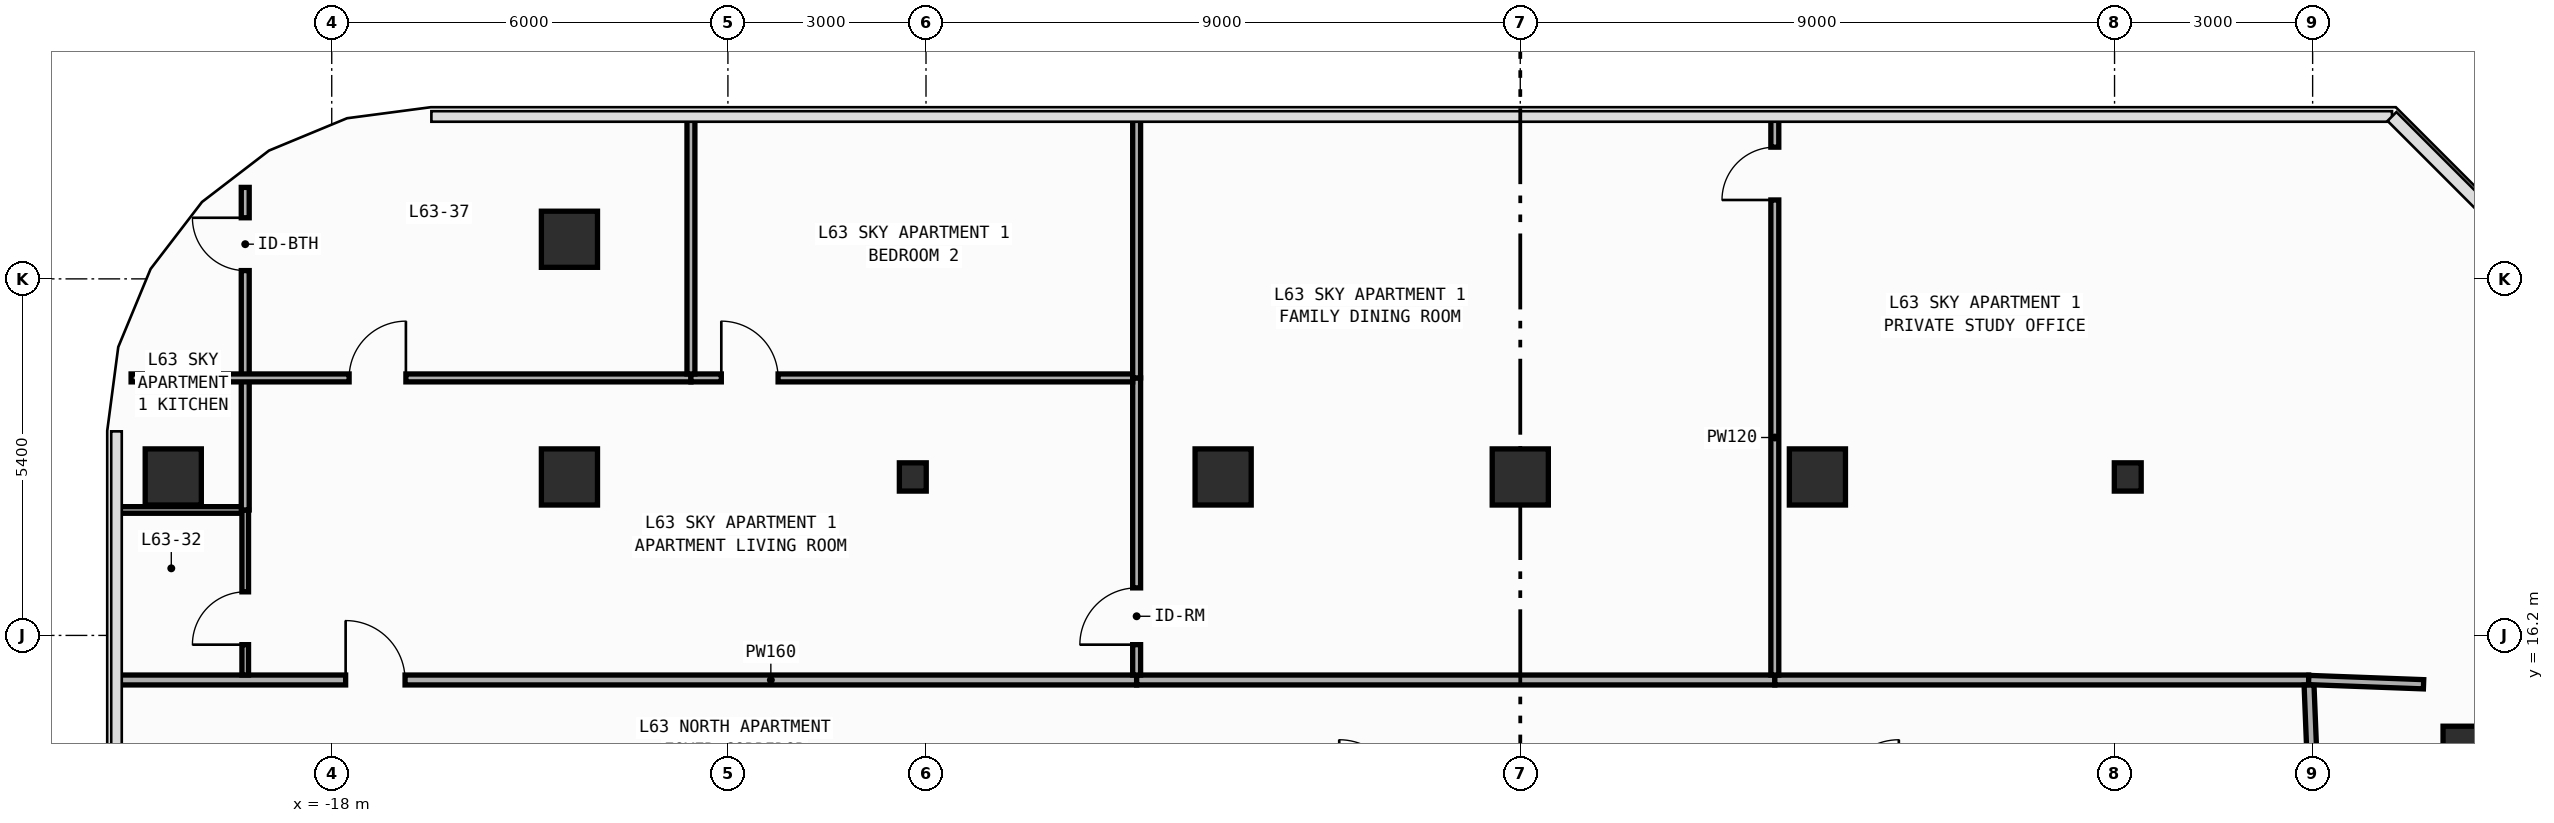
"""IFC4 building model, lengths in metres.
Left out: names, types, materials, properties, quantities, classifications, styles, units other than length and angle.
Written with IfcOpenShell. Run it as: python <this file> out.ifc"""

import sys

from ifc_helpers import new_model, si_unit, direction, frame, frame_2d, origin, origin_2d, place, context, subcontext, project, spatial, rectangle, i_section, extrude, element, fill, save


model = new_model("IFC4")
c1 = context("Model", 3, precision=1e-05, world=origin(), true_north=direction((0.0, 1.0)))
c2 = subcontext(c1, "Body", "Model", "MODEL_VIEW")
j1 = project(units=[si_unit("LENGTHUNIT", "METRE"), si_unit("PLANEANGLEUNIT", "RADIAN")], contexts=[c1])
p1 = place(None, origin())
s1 = spatial("IfcSite", under=j1, at=p1, CompositionType="ELEMENT")
p2 = place(p1, origin())
s2 = spatial("IfcBuilding", under=s1, at=p2, CompositionType="ELEMENT")
p3 = place(p2, frame((0.0, 0.0, 265.6)))
s3 = spatial("IfcBuildingStorey", under=s2, at=p3, CompositionType="ELEMENT", Elevation=265.6)
for number, where, z_axis, x_axis in (
    (1, (-9.2, 18.6, 0.0), (0.0, 0.0, 1.0), (1.0, 0.0, 0.0)),
    (2, (9.2, 18.6, 0.0), (0.0, 0.0, 1.0), (1.0, 0.0, 0.0)),
):
    element("IfcColumn", number, at=place(p3, frame(where, z_axis=z_axis, x_axis=x_axis)), inside=s3, PredefinedType="COLUMN", context=c2, shape_type="SweptSolid", body=[
        extrude(i_section(OverallWidth=0.407, OverallDepth=0.428, WebThickness=0.02, FlangeThickness=0.035, FilletRadius=0.022, at=origin_2d()), origin(), (0.0, 0.0, 1.0), 3.6),
    ])
for number, where, z_axis, x_axis in (
    (3, (-20.4, 18.6, 0.0), (0.0, 0.0, 1.0), (1.0, 0.0, 0.0)),
    (4, (-14.4, 18.6, 0.0), (0.0, 0.0, 1.0), (1.0, 0.0, 0.0)),
    (5, (14.4, 14.4, 0.0), (0.0, 0.0, 1.0), (1.0, 0.0, 0.0)),
    (6, (-4.5, 18.6, 0.0), (0.0, 0.0, 1.0), (1.0, 0.0, 0.0)),
    (7, (0.0, 18.6, 0.0), (0.0, 0.0, 1.0), (1.0, 0.0, 0.0)),
    (8, (4.5, 18.6, 0.0), (0.0, 0.0, 1.0), (1.0, 0.0, 0.0)),
    (9, (-14.4, 22.2, 0.0), (0.0, 0.0, 1.0), (1.0, 0.0, 0.0)),
):
    element("IfcColumn", number, at=place(p3, frame(where, z_axis=z_axis, x_axis=x_axis)), inside=s3, PredefinedType="COLUMN", context=c2, shape_type="SweptSolid", body=[
        extrude(rectangle(XDim=0.85, YDim=0.85, at=origin_2d()), origin(), (0.0, 0.0, 1.0), 3.6),
    ])
p4 = place(p3, frame((-21.255, 15.525, 0.0), z_axis=(0.0, 0.0, 1.0), x_axis=(1.0, 0.0, 0.0)))
e10 = element("IfcWall", 10, at=p4, inside=s3, PredefinedType="PARTITIONING", context=c2, shape_type="SweptSolid", body=[
    extrude(rectangle(XDim=15.445, YDim=0.15, at=frame_2d((7.722, 0.0))), origin(), (0.0, 0.0, 1.0), 3.34),
])
p5 = place(p4, frame((3.466, 0.0, 0.0)))
e11 = element("IfcOpeningElement", 11, at=p5, cuts=e10, PredefinedType="OPENING", context=c2, shape_type="SweptSolid", body=[
    extrude(rectangle(XDim=0.9, YDim=2.15, at=frame_2d((0.45, 1.075))), frame((0.0, 0.085, 0.0), z_axis=(0.0, -1.0, 0.0), x_axis=(1.0, 0.0, 0.0)), (0.0, 0.0, 1.0), 0.17),
])
p6 = place(p3, frame((-5.81, 15.525, 0.0), z_axis=(0.0, 0.0, 1.0), x_axis=(1.0, 0.0, 0.0)))
e12 = element("IfcWall", 12, at=p6, inside=s3, PredefinedType="PARTITIONING", context=c2, shape_type="SweptSolid", body=[
    extrude(rectangle(XDim=9.665, YDim=0.15, at=frame_2d((4.833, 0.0))), origin(), (0.0, 0.0, 1.0), 3.34),
])
p7 = place(p3, frame((3.855, 15.525, 0.0), z_axis=(0.0, 0.0, 1.0), x_axis=(1.0, 0.0, 0.0)))
e13 = element("IfcWall", 13, at=p7, inside=s3, PredefinedType="PARTITIONING", context=c2, shape_type="SweptSolid", body=[
    extrude(rectangle(XDim=8.085, YDim=0.15, at=frame_2d((4.042, 0.0))), origin(), (0.0, 0.0, 1.0), 3.34),
])
p8 = place(p3, frame((12.015, 13.72, 0.0), z_axis=(0.0, 0.0, 1.0), x_axis=(-0.040046877756, 0.99919780203, 0.0)))
e14 = element("IfcWall", 14, at=p8, inside=s3, PredefinedType="PARTITIONING", context=c2, shape_type="SweptSolid", body=[
    extrude(rectangle(XDim=1.731, YDim=0.15, at=frame_2d((0.866, 0.0))), origin(), (0.0, 0.0, 1.0), 3.34),
])
p9 = place(p3, frame((-21.255, 18.1, 0.0), z_axis=(0.0, 0.0, 1.0), x_axis=(1.0, 0.0, 0.0)))
e15 = element("IfcWall", 15, at=p9, inside=s3, PredefinedType="PARTITIONING", context=c2, shape_type="SweptSolid", body=[
    extrude(rectangle(XDim=1.895, YDim=0.1, at=frame_2d((0.947, 0.0))), origin(), (0.0, 0.0, 1.0), 3.34),
])
p10 = place(p3, frame((-19.31, 15.6, 0.0), z_axis=(0.0, 0.0, 1.0), x_axis=(0.0, 1.0, 0.0)))
e16 = element("IfcWall", 16, at=p10, inside=s3, PredefinedType="PARTITIONING", context=c2, shape_type="SweptSolid", body=[
    extrude(rectangle(XDim=2.5, YDim=0.1, at=frame_2d((1.25, 0.0))), origin(), (0.0, 0.0, 1.0), 3.34),
])
p11 = place(p10, frame((0.46, 0.0, 0.0)))
e17 = element("IfcOpeningElement", 17, at=p11, cuts=e16, PredefinedType="OPENING", context=c2, shape_type="SweptSolid", body=[
    extrude(rectangle(XDim=0.8, YDim=2.1, at=frame_2d((0.4, 1.05))), frame((0.0, 0.06, 0.0), z_axis=(0.0, -1.0, 0.0), x_axis=(1.0, 0.0, 0.0)), (0.0, 0.0, 1.0), 0.12),
])
p12 = place(p3, frame((-19.31, 18.1, 0.0), z_axis=(0.0, 0.0, 1.0), x_axis=(0.0, 1.0, 0.0)))
e18 = element("IfcWall", 18, at=p12, inside=s3, PredefinedType="PARTITIONING", context=c2, shape_type="SweptSolid", body=[
    extrude(rectangle(XDim=2.0, YDim=0.12, at=frame_2d((1.0, 0.0))), origin(), (0.0, 0.0, 1.0), 3.34),
])
p13 = place(p3, frame((-19.31, 20.1, 0.0), z_axis=(0.0, 0.0, 1.0), x_axis=(0.0, 1.0, 0.0)))
e19 = element("IfcWall", 19, at=p13, inside=s3, PredefinedType="PARTITIONING", context=c2, shape_type="SweptSolid", body=[
    extrude(rectangle(XDim=2.885, YDim=0.12, at=frame_2d((1.443, 0.0))), origin(), (0.0, 0.0, 1.0), 3.34),
])
p14 = place(p13, frame((1.625, 0.0, 0.0)))
e20 = element("IfcOpeningElement", 20, at=p14, cuts=e19, PredefinedType="OPENING", context=c2, shape_type="SweptSolid", body=[
    extrude(rectangle(XDim=0.8, YDim=2.1, at=frame_2d((0.4, 1.05))), frame((0.0, 0.07, 0.0), z_axis=(0.0, -1.0, 0.0), x_axis=(1.0, 0.0, 0.0)), (0.0, 0.0, 1.0), 0.14),
])
p15 = place(p3, frame((-5.81, 15.6, 0.0), z_axis=(0.0, 0.0, 1.0), x_axis=(0.0, 1.0, 0.0)))
e21 = element("IfcWall", 21, at=p15, inside=s3, PredefinedType="PARTITIONING", context=c2, shape_type="SweptSolid", body=[
    extrude(rectangle(XDim=4.5, YDim=0.12, at=frame_2d((2.25, 0.0))), origin(), (0.0, 0.0, 1.0), 3.34),
])
p16 = place(p15, frame((0.46, 0.0, 0.0)))
e22 = element("IfcOpeningElement", 22, at=p16, cuts=e21, PredefinedType="OPENING", context=c2, shape_type="SweptSolid", body=[
    extrude(rectangle(XDim=0.86, YDim=2.15, at=frame_2d((0.43, 1.075))), frame((0.0, 0.07, 0.0), z_axis=(0.0, -1.0, 0.0), x_axis=(1.0, 0.0, 0.0)), (0.0, 0.0, 1.0), 0.14),
])
p17 = place(p3, frame((-21.039, 20.1, 0.0), z_axis=(0.0, 0.0, 1.0), x_axis=(1.0, 0.0, 0.0)))
e23 = element("IfcWall", 23, at=p17, inside=s3, PredefinedType="PARTITIONING", context=c2, shape_type="SweptSolid", body=[
    extrude(rectangle(XDim=8.479, YDim=0.12, at=frame_2d((4.239, 0.0))), origin(), (0.0, 0.0, 1.0), 3.34),
])
p18 = place(p17, frame((3.302, 0.0, 0.0)))
e24 = element("IfcOpeningElement", 24, at=p18, cuts=e23, PredefinedType="OPENING", context=c2, shape_type="SweptSolid", body=[
    extrude(rectangle(XDim=0.86, YDim=2.15, at=frame_2d((0.43, 1.075))), frame((0.0, 0.07, 0.0), z_axis=(0.0, -1.0, 0.0), x_axis=(1.0, 0.0, 0.0)), (0.0, 0.0, 1.0), 0.14),
])
p19 = place(p3, frame((-12.56, 20.1, 0.0), z_axis=(0.0, 0.0, 1.0), x_axis=(1.0, 0.0, 0.0)))
e25 = element("IfcWall", 25, at=p19, inside=s3, PredefinedType="PARTITIONING", context=c2, shape_type="SweptSolid", body=[
    extrude(rectangle(XDim=6.69, YDim=0.12, at=frame_2d((3.345, 0.0))), origin(), (0.0, 0.0, 1.0), 3.34),
])
p20 = place(p19, frame((0.46, 0.0, 0.0)))
e26 = element("IfcOpeningElement", 26, at=p20, cuts=e25, PredefinedType="OPENING", context=c2, shape_type="SweptSolid", body=[
    extrude(rectangle(XDim=0.86, YDim=2.15, at=frame_2d((0.43, 1.075))), frame((0.0, 0.07, 0.0), z_axis=(0.0, -1.0, 0.0), x_axis=(1.0, 0.0, 0.0)), (0.0, 0.0, 1.0), 0.14),
])
p21 = place(p3, frame((3.855, 15.6, 0.0), z_axis=(0.0, 0.0, 1.0), x_axis=(0.0, 1.0, 0.0)))
e27 = element("IfcWall", 27, at=p21, inside=s3, PredefinedType="PARTITIONING", context=c2, shape_type="SweptSolid", body=[
    extrude(rectangle(XDim=8.455, YDim=0.12, at=frame_2d((4.228, 0.0))), origin(), (0.0, 0.0, 1.0), 3.34),
])
p22 = place(p21, frame((7.195, 0.0, 0.0)))
e28 = element("IfcOpeningElement", 28, at=p22, cuts=e27, PredefinedType="OPENING", context=c2, shape_type="SweptSolid", body=[
    extrude(rectangle(XDim=0.8, YDim=2.1, at=frame_2d((0.4, 1.05))), frame((0.0, 0.07, 0.0), z_axis=(0.0, -1.0, 0.0), x_axis=(1.0, 0.0, 0.0)), (0.0, 0.0, 1.0), 0.14),
])
p23 = place(p3, frame((-5.81, 20.1, 0.0), z_axis=(0.0, 0.0, 1.0), x_axis=(0.0, 1.0, 0.0)))
e29 = element("IfcWall", 29, at=p23, inside=s3, PredefinedType="PARTITIONING", context=c2, shape_type="SweptSolid", body=[
    extrude(rectangle(XDim=3.955, YDim=0.12, at=frame_2d((1.978, 0.0))), origin(), (0.0, 0.0, 1.0), 3.34),
])
p24 = place(p3, frame((11.94, 15.525, 0.0), z_axis=(0.0, 0.0, 1.0), x_axis=(0.999304229002, -0.037296888581, 0.0)))
e30 = element("IfcWall", 30, at=p24, inside=s3, PredefinedType="PARTITIONING", context=c2, shape_type="SweptSolid", body=[
    extrude(rectangle(XDim=1.741, YDim=0.14, at=frame_2d((0.871, 0.0))), origin(), (0.0, 0.0, 1.0), 3.34),
])
p25 = place(p3, frame((-12.56, 20.16, 0.0), z_axis=(0.0, 0.0, 1.0), x_axis=(0.0, 1.0, 0.0)))
e31 = element("IfcWall", 31, at=p25, inside=s3, PredefinedType="PARTITIONING", context=c2, shape_type="SweptSolid", body=[
    extrude(rectangle(XDim=3.895, YDim=0.12, at=frame_2d((1.948, 0.0))), origin(), (0.0, 0.0, 1.0), 3.34),
])
p26 = place(p5, origin())
e32 = element("IfcDoor", 32, at=p26, inside=s3, OperationType="SINGLE_SWING_LEFT", PredefinedType="DOOR", context=c2, shape_type="SweptSolid", body=[
    extrude(rectangle(XDim=0.9, YDim=2.15, at=frame_2d((0.45, 1.075))), frame((0.0, 0.025, 0.0), z_axis=(0.0, -1.0, 0.0), x_axis=(1.0, 0.0, 0.0)), (0.0, 0.0, 1.0), 0.05),
])
fill(e11, e32)
p27 = place(p11, origin())
e33 = element("IfcDoor", 33, at=p27, inside=s3, OperationType="SINGLE_SWING_LEFT", PredefinedType="DOOR", context=c2, shape_type="SweptSolid", body=[
    extrude(rectangle(XDim=0.8, YDim=2.1, at=frame_2d((0.4, 1.05))), frame((0.0, 0.025, 0.0), z_axis=(0.0, -1.0, 0.0), x_axis=(1.0, 0.0, 0.0)), (0.0, 0.0, 1.0), 0.05),
])
fill(e17, e33)
p28 = place(p16, origin())
e34 = element("IfcDoor", 34, at=p28, inside=s3, OperationType="SINGLE_SWING_LEFT", PredefinedType="DOOR", context=c2, shape_type="SweptSolid", body=[
    extrude(rectangle(XDim=0.86, YDim=2.15, at=frame_2d((0.43, 1.075))), frame((0.0, 0.025, 0.0), z_axis=(0.0, -1.0, 0.0), x_axis=(1.0, 0.0, 0.0)), (0.0, 0.0, 1.0), 0.05),
])
fill(e22, e34)
p29 = place(p18, origin())
e35 = element("IfcDoor", 35, at=p29, inside=s3, OperationType="SINGLE_SWING_RIGHT", PredefinedType="DOOR", context=c2, shape_type="SweptSolid", body=[
    extrude(rectangle(XDim=0.86, YDim=2.15, at=frame_2d((0.43, 1.075))), frame((0.0, 0.025, 0.0), z_axis=(0.0, -1.0, 0.0), x_axis=(1.0, 0.0, 0.0)), (0.0, 0.0, 1.0), 0.05),
])
fill(e24, e35)
p30 = place(p20, origin())
e36 = element("IfcDoor", 36, at=p30, inside=s3, OperationType="SINGLE_SWING_LEFT", PredefinedType="DOOR", context=c2, shape_type="SweptSolid", body=[
    extrude(rectangle(XDim=0.86, YDim=2.15, at=frame_2d((0.43, 1.075))), frame((0.0, 0.025, 0.0), z_axis=(0.0, -1.0, 0.0), x_axis=(1.0, 0.0, 0.0)), (0.0, 0.0, 1.0), 0.05),
])
fill(e26, e36)
p31 = place(p22, origin())
e37 = element("IfcDoor", 37, at=p31, inside=s3, OperationType="SINGLE_SWING_LEFT", PredefinedType="DOOR", context=c2, shape_type="SweptSolid", body=[
    extrude(rectangle(XDim=0.8, YDim=2.1, at=frame_2d((0.4, 1.05))), frame((0.0, 0.025, 0.0), z_axis=(0.0, -1.0, 0.0), x_axis=(1.0, 0.0, 0.0)), (0.0, 0.0, 1.0), 0.05),
])
fill(e28, e37)
p32 = place(p14, origin())
e38 = element("IfcDoor", 38, at=p32, inside=s3, OperationType="SINGLE_SWING_RIGHT", PredefinedType="DOOR", context=c2, shape_type="SweptSolid", body=[
    extrude(rectangle(XDim=0.8, YDim=2.1, at=frame_2d((0.4, 1.05))), frame((0.0, 0.025, 0.0), z_axis=(0.0, -1.0, 0.0), x_axis=(1.0, 0.0, 0.0)), (0.0, 0.0, 1.0), 0.05),
])
fill(e20, e38)
save(model, sys.argv[1])
